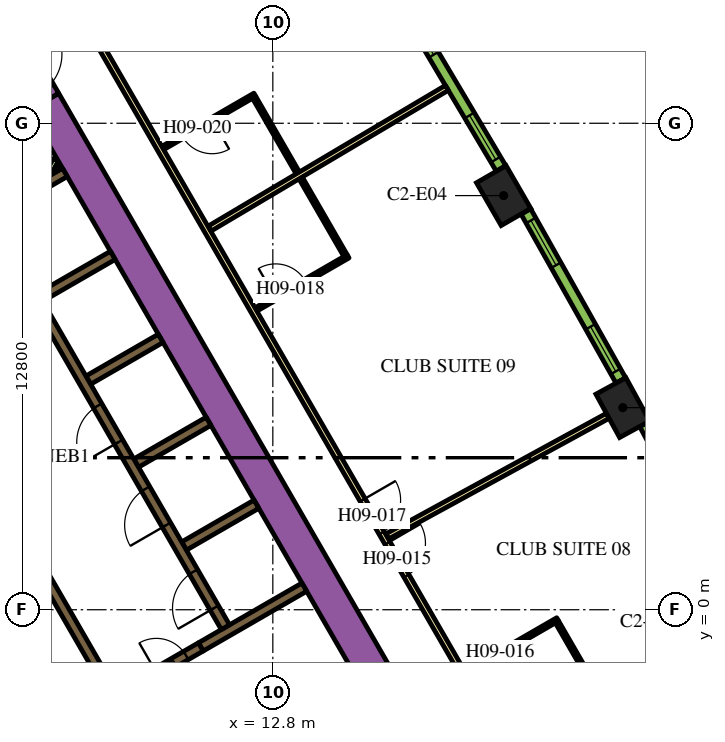
"""IFC4 building model, lengths in metres.
Left out: names, types, materials, properties, quantities, classifications, styles, units other than length and angle.
Written with IfcOpenShell. Run it as: python <this file> out.ifc"""

import sys

from ifc_helpers import new_model, si_unit, direction, frame, frame_2d, origin, origin_2d, place, context, subcontext, project, spatial, polyline, rectangle, outline, extrude, element, fill, save


model = new_model("IFC4")
c1 = context("Model", 3, precision=1e-05, world=origin(), true_north=direction((0.0, 1.0)))
c2 = subcontext(c1, "Body", "Model", "MODEL_VIEW")
j1 = project(units=[si_unit("LENGTHUNIT", "METRE"), si_unit("PLANEANGLEUNIT", "RADIAN")], contexts=[c1])
p1 = place(None, origin())
s1 = spatial("IfcSite", under=j1, at=p1, CompositionType="ELEMENT")
p2 = place(p1, origin())
s2 = spatial("IfcBuilding", under=s1, at=p2, CompositionType="ELEMENT")
p3 = place(p2, frame((0.0, 0.0, 118.8)))
s3 = spatial("IfcBuildingStorey", under=s2, at=p3, CompositionType="ELEMENT", Elevation=118.8)
for number, where, z_axis, x_axis in (
    (1, (22.009, 5.317, 0.0), (0.0, 0.0, 1.0), (-0.48, 0.877, 0.0)),
    (2, (18.874, 10.897, 0.0), (0.0, 0.0, 1.0), (-0.5, 0.866, 0.0)),
):
    element("IfcColumn", number, at=place(p3, frame(where, z_axis=z_axis, x_axis=x_axis)), inside=s3, PredefinedType="COLUMN", context=c2, shape_type="SweptSolid", body=[
        extrude(rectangle(XDim=1.3, YDim=0.9, at=origin_2d()), origin(), (0.0, 0.0, 1.0), 3.9),
    ])
p4 = place(p3, frame((6.776, 13.364, 0.0), z_axis=(0.0, 0.0, 1.0), x_axis=(0.500004177138, -0.8660229921, 0.0)))
e3 = element("IfcWall", 3, at=p4, inside=s3, PredefinedType="SOLIDWALL", context=c2, shape_type="SweptSolid", body=[
    extrude(rectangle(XDim=20.204, YDim=0.9, at=frame_2d((10.102, 0.0))), origin(), (0.0, 0.0, 1.0), 3.9),
])
p5 = place(p3, frame((10.464, 1.677, 0.0), z_axis=(0.0, 0.0, 1.0), x_axis=(0.86605622881, 0.499946605688, 0.0)))
e4 = element("IfcWall", 4, at=p5, inside=s3, PredefinedType="SOLIDWALL", context=c2, shape_type="SweptSolid", body=[
    extrude(rectangle(XDim=2.2, YDim=0.25, at=frame_2d((1.1, 0.0))), origin(), (0.0, 0.0, 1.0), 3.9),
])
p6 = place(p3, frame((13.629, 0.594, 0.0), z_axis=(0.0, 0.0, 1.0), x_axis=(-0.86602790099, -0.499995674689, 0.0)))
e5 = element("IfcWall", 5, at=p6, inside=s3, PredefinedType="SOLIDWALL", context=c2, shape_type="SweptSolid", body=[
    extrude(rectangle(XDim=3.146, YDim=0.25, at=frame_2d((1.573, 0.0))), origin(), (0.0, 0.0, 1.0), 3.9),
])
for number, where, z_axis, x_axis in (
    (6, (9.204, 3.859, 0.0), (0.0, 0.0, 1.0), (0.866, 0.5, 0.0)),
    (7, (7.944, 6.041, 0.0), (0.0, 0.0, 1.0), (0.866, 0.5, 0.0)),
    (8, (6.684, 8.224, 0.0), (0.0, 0.0, 1.0), (0.866, 0.5, 0.0)),
):
    element("IfcWall", number, at=place(p3, frame(where, z_axis=z_axis, x_axis=x_axis)), inside=s3, PredefinedType="SOLIDWALL", context=c2, shape_type="SweptSolid", body=[
        extrude(rectangle(XDim=2.2, YDim=0.25, at=frame_2d((1.1, 0.0))), origin(), (0.0, 0.0, 1.0), 3.9),
    ])
p7 = place(p3, origin())
e9 = element("IfcWall", 9, at=p7, inside=s3, PredefinedType="SOLIDWALL", context=c2, shape_type="SweptSolid", body=[
    extrude(outline(polyline([(5.27, 10.173), (5.27, 10.173), (4.683, 9.834), (4.504, 9.731), (4.442, 9.839), (4.431, 9.856), (4.419, 9.871), (4.406, 9.885), (4.39, 9.898), (4.374, 9.909), (4.357, 9.918), (4.341, 9.925), (7.266, 11.614), (7.391, 11.398), (5.486, 10.298), (5.486, 10.298), (5.27, 10.173), (5.27, 10.173)])), origin(), (0.0, 0.0, 1.0), 3.9),
])
p8 = place(p3, frame((6.872, 11.45, 0.0), z_axis=(0.0, 0.0, 1.0), x_axis=(0.499846793097, 0.866113839764, 0.0)))
e10 = element("IfcWall", 10, at=p8, inside=s3, PredefinedType="PARTITIONING", context=c2, shape_type="SweptSolid", body=[
    extrude(rectangle(XDim=0.453, YDim=0.15, at=frame_2d((0.227, 0.0))), origin(), (0.0, 0.0, 1.0), 2.75),
])
p9 = place(p3, frame((7.131, 11.6, 0.0), z_axis=(0.0, 0.0, 1.0), x_axis=(0.498600033135, 0.866832167699, 0.0)))
e11 = element("IfcWall", 11, at=p9, inside=s3, PredefinedType="PARTITIONING", context=c2, shape_type="SweptSolid", body=[
    extrude(rectangle(XDim=0.107, YDim=0.15, at=frame_2d((0.053, 0.0))), origin(), (0.0, 0.0, 1.0), 2.75),
])
p10 = place(p3, frame((11.553, -0.46, 0.0), z_axis=(0.0, 0.0, 1.0), x_axis=(-0.500006514828, 0.866021642414, 0.0)))
e12 = element("IfcWall", 12, at=p10, inside=s3, PredefinedType="SOLIDWALL", context=c2, shape_type="SweptSolid", body=[
    extrude(rectangle(XDim=12.35, YDim=0.25, at=frame_2d((6.175, 0.0))), origin(), (0.0, 0.0, 1.0), 3.9),
])
p11 = place(p10, frame((0.585, 0.0, 0.0)))
e13 = element("IfcOpeningElement", 13, at=p11, cuts=e12, PredefinedType="OPENING", context=c2, shape_type="SweptSolid", body=[
    extrude(rectangle(XDim=1.1, YDim=2.1, at=frame_2d((0.55, 1.05))), frame((0.0, 0.135, 0.0), z_axis=(0.0, -1.0, 0.0), x_axis=(1.0, 0.0, 0.0)), (0.0, 0.0, 1.0), 0.27),
])
p12 = place(p10, frame((3.105, 0.0, 0.0)))
e14 = element("IfcOpeningElement", 14, at=p12, cuts=e12, PredefinedType="OPENING", context=c2, shape_type="SweptSolid", body=[
    extrude(rectangle(XDim=1.1, YDim=2.1, at=frame_2d((0.55, 1.05))), frame((0.0, 0.135, 0.0), z_axis=(0.0, -1.0, 0.0), x_axis=(1.0, 0.0, 0.0)), (0.0, 0.0, 1.0), 0.27),
])
p13 = place(p10, frame((5.625, 0.0, 0.0)))
e15 = element("IfcOpeningElement", 15, at=p13, cuts=e12, PredefinedType="OPENING", context=c2, shape_type="SweptSolid", body=[
    extrude(rectangle(XDim=1.1, YDim=2.1, at=frame_2d((0.55, 1.05))), frame((0.0, 0.135, 0.0), z_axis=(0.0, -1.0, 0.0), x_axis=(1.0, 0.0, 0.0)), (0.0, 0.0, 1.0), 0.27),
])
p14 = place(p3, frame((8.565, -2.185, 0.0), z_axis=(0.0, 0.0, 1.0), x_axis=(-0.499997954832, 0.866026584559, 0.0)))
e16 = element("IfcWall", 16, at=p14, inside=s3, PredefinedType="SOLIDWALL", context=c2, shape_type="SweptSolid", body=[
    extrude(rectangle(XDim=12.35, YDim=0.25, at=frame_2d((6.175, 0.0))), origin(), (0.0, 0.0, 1.0), 3.9),
])
p15 = place(p14, frame((5.725, 0.0, 0.0)))
e17 = element("IfcOpeningElement", 17, at=p15, cuts=e16, PredefinedType="OPENING", context=c2, shape_type="SweptSolid", body=[
    extrude(rectangle(XDim=0.9, YDim=2.1, at=frame_2d((0.45, 1.05))), frame((0.0, 0.135, 0.0), z_axis=(0.0, -1.0, 0.0), x_axis=(1.0, 0.0, 0.0)), (0.0, 0.0, 1.0), 0.27),
])
p16 = place(p3, frame((9.346, -1.879, 0.0), z_axis=(0.0, 0.0, 1.0), x_axis=(0.866047807691, 0.499961193289, 0.0)))
e18 = element("IfcWall", 18, at=p16, inside=s3, PredefinedType="SOLIDWALL", context=c2, shape_type="SweptSolid", body=[
    extrude(rectangle(XDim=1.8, YDim=0.25, at=frame_2d((0.9, 0.0))), origin(), (0.0, 0.0, 1.0), 3.9),
])
p17 = place(p16, frame((0.45, 0.0, 0.0)))
e19 = element("IfcOpeningElement", 19, at=p17, cuts=e18, PredefinedType="OPENING", context=c2, shape_type="SweptSolid", body=[
    extrude(rectangle(XDim=0.9, YDim=2.1, at=frame_2d((0.45, 1.05))), frame((0.0, 0.135, 0.0), z_axis=(0.0, -1.0, 0.0), x_axis=(1.0, 0.0, 0.0)), (0.0, 0.0, 1.0), 0.27),
])
p18 = place(p3, frame((5.926, 14.836, 0.0), z_axis=(0.0, 0.0, 1.0), x_axis=(0.500062241894, -0.865989465428, 0.0)))
e20 = element("IfcWall", 20, at=p18, inside=s3, PredefinedType="SOLIDWALL", context=c2, shape_type="SweptSolid", body=[
    extrude(rectangle(XDim=1.7, YDim=0.9, at=frame_2d((0.85, 0.0))), origin(), (0.0, 0.0, 1.0), 3.9),
])
p19 = place(p18, frame((0.25, 0.0, 0.0)))
e21 = element("IfcOpeningElement", 21, at=p19, cuts=e20, PredefinedType="OPENING", context=c2, shape_type="SweptSolid", body=[
    extrude(rectangle(XDim=1.2, YDim=2.1, at=frame_2d((0.6, 1.05))), frame((0.0, 0.46, 0.0), z_axis=(0.0, -1.0, 0.0), x_axis=(1.0, 0.0, 0.0)), (0.0, 0.0, 1.0), 0.92),
])
p20 = place(p3, frame((6.163, 18.475, 0.0), z_axis=(0.0, 0.0, 1.0), x_axis=(0.500001317485, -0.866024643133, 0.0)))
e22 = element("IfcWall", 22, at=p20, inside=s3, PredefinedType="PARTITIONING", context=c2, shape_type="SweptSolid", body=[
    extrude(rectangle(XDim=25.767, YDim=0.15, at=frame_2d((12.883, 0.0))), origin(), (0.0, 0.0, 1.0), 2.75),
])
p21 = place(p20, frame((19.306, 0.0, 0.0)))
e23 = element("IfcOpeningElement", 23, at=p21, cuts=e22, PredefinedType="OPENING", context=c2, shape_type="SweptSolid", body=[
    extrude(rectangle(XDim=1.0, YDim=2.1, at=frame_2d((0.5, 1.05))), frame((0.0, 0.085, 0.0), z_axis=(0.0, -1.0, 0.0), x_axis=(1.0, 0.0, 0.0)), (0.0, 0.0, 1.0), 0.17),
])
p22 = place(p20, frame((17.999, 0.0, 0.0)))
e24 = element("IfcOpeningElement", 24, at=p22, cuts=e22, PredefinedType="OPENING", context=c2, shape_type="SweptSolid", body=[
    extrude(rectangle(XDim=1.0, YDim=2.1, at=frame_2d((0.5, 1.05))), frame((0.0, 0.085, 0.0), z_axis=(0.0, -1.0, 0.0), x_axis=(1.0, 0.0, 0.0)), (0.0, 0.0, 1.0), 0.17),
])
p23 = place(p20, frame((0.596, 0.0, 0.0)))
e25 = element("IfcOpeningElement", 25, at=p23, cuts=e22, PredefinedType="OPENING", context=c2, shape_type="SweptSolid", body=[
    extrude(rectangle(XDim=1.0, YDim=2.1, at=frame_2d((0.5, 1.05))), frame((0.0, 0.085, 0.0), z_axis=(0.0, -1.0, 0.0), x_axis=(1.0, 0.0, 0.0)), (0.0, 0.0, 1.0), 0.17),
])
p24 = place(p3, frame((17.379, 13.731, 0.0), z_axis=(0.0, 0.0, 1.0), x_axis=(-0.860132461691, -0.510070728768, 0.0)))
e26 = element("IfcWall", 26, at=p24, inside=s3, PredefinedType="PARTITIONING", context=c2, shape_type="SweptSolid", body=[
    extrude(rectangle(XDim=7.257, YDim=0.15, at=frame_2d((3.628, 0.0))), origin(), (0.0, 0.0, 1.0), 2.75),
])
p25 = place(p3, frame((21.614, 5.102, 0.0), z_axis=(0.0, 0.0, 1.0), x_axis=(-0.877484555087, -0.479604895287, 0.0)))
e27 = element("IfcWall", 27, at=p25, inside=s3, PredefinedType="PARTITIONING", context=c2, shape_type="SweptSolid", body=[
    extrude(rectangle(XDim=6.611, YDim=0.15, at=frame_2d((3.306, 0.0))), origin(), (0.0, 0.0, 1.0), 2.75),
])
p26 = place(p3, frame((20.296, -0.254, 0.0), z_axis=(0.0, 0.0, 1.0), x_axis=(-0.866034573852, -0.49998411664, 0.0)))
e28 = element("IfcWall", 28, at=p26, inside=s3, PredefinedType="PARTITIONING", context=c2, shape_type="SweptSolid", body=[
    extrude(rectangle(XDim=2.8, YDim=0.1, at=frame_2d((1.4, 0.0))), origin(), (0.0, 0.0, 1.0), 2.75),
])
p27 = place(p26, frame((1.3, 0.0, 0.0)))
e29 = element("IfcOpeningElement", 29, at=p27, cuts=e28, PredefinedType="OPENING", context=c2, shape_type="SweptSolid", body=[
    extrude(rectangle(XDim=0.9, YDim=2.1, at=frame_2d((0.45, 1.05))), frame((0.0, 0.06, 0.0), z_axis=(0.0, -1.0, 0.0), x_axis=(1.0, 0.0, 0.0)), (0.0, 0.0, 1.0), 0.12),
])
p28 = place(p3, frame((20.278, -0.323, 0.0), z_axis=(0.0, 0.0, 1.0), x_axis=(0.500001309137, -0.866024647952, 0.0)))
e30 = element("IfcWall", 30, at=p28, inside=s3, PredefinedType="PARTITIONING", context=c2, shape_type="SweptSolid", body=[
    extrude(rectangle(XDim=2.4, YDim=0.1, at=frame_2d((1.2, 0.0))), origin(), (0.0, 0.0, 1.0), 2.75),
])
p29 = place(p3, frame((12.355, 7.9, 0.0), z_axis=(0.0, 0.0, 1.0), x_axis=(0.866034573852, 0.49998411664, 0.0)))
e31 = element("IfcWall", 31, at=p29, inside=s3, PredefinedType="PARTITIONING", context=c2, shape_type="SweptSolid", body=[
    extrude(rectangle(XDim=2.8, YDim=0.1, at=frame_2d((1.4, 0.0))), origin(), (0.0, 0.0, 1.0), 2.75),
])
p30 = place(p29, frame((0.6, 0.0, 0.0)))
e32 = element("IfcOpeningElement", 32, at=p30, cuts=e31, PredefinedType="OPENING", context=c2, shape_type="SweptSolid", body=[
    extrude(rectangle(XDim=0.9, YDim=2.1, at=frame_2d((0.45, 1.05))), frame((0.0, 0.06, 0.0), z_axis=(0.0, -1.0, 0.0), x_axis=(1.0, 0.0, 0.0)), (0.0, 0.0, 1.0), 0.12),
])
p31 = place(p3, frame((14.712, 9.318, 0.0), z_axis=(0.0, 0.0, 1.0), x_axis=(-0.50000006957, 0.866025363618, 0.0)))
e33 = element("IfcWall", 33, at=p31, inside=s3, PredefinedType="PARTITIONING", context=c2, shape_type="SweptSolid", body=[
    extrude(rectangle(XDim=2.36, YDim=0.1, at=frame_2d((1.18, 0.0))), origin(), (0.0, 0.0, 1.0), 2.75),
])
p32 = place(p3, frame((12.327, 13.549, 0.0), z_axis=(0.0, 0.0, 1.0), x_axis=(-0.866056369097, -0.49994636267, 0.0)))
e34 = element("IfcWall", 34, at=p32, inside=s3, PredefinedType="PARTITIONING", context=c2, shape_type="SweptSolid", body=[
    extrude(rectangle(XDim=2.8, YDim=0.1, at=frame_2d((1.4, 0.0))), origin(), (0.0, 0.0, 1.0), 2.75),
])
p33 = place(p32, frame((1.3, 0.0, 0.0)))
e35 = element("IfcOpeningElement", 35, at=p33, cuts=e34, PredefinedType="OPENING", context=c2, shape_type="SweptSolid", body=[
    extrude(rectangle(XDim=0.9, YDim=2.1, at=frame_2d((0.45, 1.05))), frame((0.0, 0.06, 0.0), z_axis=(0.0, -1.0, 0.0), x_axis=(1.0, 0.0, 0.0)), (0.0, 0.0, 1.0), 0.12),
])
p34 = place(p3, frame((12.309, 13.481, 0.0), z_axis=(0.0, 0.0, 1.0), x_axis=(0.499968531483, -0.866043571379, 0.0)))
e36 = element("IfcWall", 36, at=p34, inside=s3, PredefinedType="PARTITIONING", context=c2, shape_type="SweptSolid", body=[
    extrude(rectangle(XDim=2.29, YDim=0.1, at=frame_2d((1.145, 0.0))), origin(), (0.0, 0.0, 1.0), 2.75),
])
p35 = place(p3, frame((24.977, 0.383, 0.0), z_axis=(0.0, 0.0, 1.0), x_axis=(-0.469323203119, 0.883026461106, 0.0)))
e37 = element("IfcWall", 37, at=p35, inside=s3, PredefinedType="SOLIDWALL", context=c2, shape_type="SweptSolid", body=[
    extrude(rectangle(XDim=5.101, YDim=0.29, at=frame_2d((2.55, 0.0))), origin(), (0.0, 0.0, 1.0), 3.65),
])
p36 = place(p35, frame((0.273, 0.0, 0.9)))
e38 = element("IfcOpeningElement", 38, at=p36, cuts=e37, PredefinedType="OPENING", context=c2, shape_type="SweptSolid", body=[
    extrude(rectangle(XDim=1.35, YDim=2.15, at=frame_2d((0.675, 1.075))), frame((0.0, 0.155, 0.0), z_axis=(0.0, -1.0, 0.0), x_axis=(1.0, 0.0, 0.0)), (0.0, 0.0, 1.0), 0.31),
])
p37 = place(p35, frame((3.478, 0.0, 0.9)))
e39 = element("IfcOpeningElement", 39, at=p37, cuts=e37, PredefinedType="OPENING", context=c2, shape_type="SweptSolid", body=[
    extrude(rectangle(XDim=1.35, YDim=2.15, at=frame_2d((0.675, 1.075))), frame((0.0, 0.155, 0.0), z_axis=(0.0, -1.0, 0.0), x_axis=(1.0, 0.0, 0.0)), (0.0, 0.0, 1.0), 0.31),
])
p38 = place(p3, frame((21.956, 6.033, 0.0), z_axis=(0.0, 0.0, 1.0), x_axis=(-0.48983164787, 0.87181704316, 0.0)))
e40 = element("IfcWall", 40, at=p38, inside=s3, PredefinedType="SOLIDWALL", context=c2, shape_type="SweptSolid", body=[
    extrude(rectangle(XDim=5.1, YDim=0.29, at=frame_2d((2.55, 0.0))), origin(), (0.0, 0.0, 1.0), 3.65),
])
p39 = place(p38, frame((0.273, 0.0, 0.9)))
e41 = element("IfcOpeningElement", 41, at=p39, cuts=e40, PredefinedType="OPENING", context=c2, shape_type="SweptSolid", body=[
    extrude(rectangle(XDim=1.35, YDim=2.15, at=frame_2d((0.675, 1.075))), frame((0.0, 0.155, 0.0), z_axis=(0.0, -1.0, 0.0), x_axis=(1.0, 0.0, 0.0)), (0.0, 0.0, 1.0), 0.31),
])
p40 = place(p38, frame((3.478, 0.0, 0.9)))
e42 = element("IfcOpeningElement", 42, at=p40, cuts=e40, PredefinedType="OPENING", context=c2, shape_type="SweptSolid", body=[
    extrude(rectangle(XDim=1.35, YDim=2.15, at=frame_2d((0.675, 1.075))), frame((0.0, 0.155, 0.0), z_axis=(0.0, -1.0, 0.0), x_axis=(1.0, 0.0, 0.0)), (0.0, 0.0, 1.0), 0.31),
])
p41 = place(p3, frame((18.805, 11.611, 0.0), z_axis=(0.0, 0.0, 1.0), x_axis=(-0.510054281659, 0.860142214847, 0.0)))
e43 = element("IfcWall", 43, at=p41, inside=s3, PredefinedType="SOLIDWALL", context=c2, shape_type="SweptSolid", body=[
    extrude(rectangle(XDim=5.101, YDim=0.29, at=frame_2d((2.55, 0.0))), origin(), (0.0, 0.0, 1.0), 3.65),
])
p42 = place(p41, frame((0.273, 0.0, 0.9)))
e44 = element("IfcOpeningElement", 44, at=p42, cuts=e43, PredefinedType="OPENING", context=c2, shape_type="SweptSolid", body=[
    extrude(rectangle(XDim=1.35, YDim=2.15, at=frame_2d((0.675, 1.075))), frame((0.0, 0.155, 0.0), z_axis=(0.0, -1.0, 0.0), x_axis=(1.0, 0.0, 0.0)), (0.0, 0.0, 1.0), 0.31),
])
p43 = place(p41, frame((3.478, 0.0, 0.9)))
e45 = element("IfcOpeningElement", 45, at=p43, cuts=e43, PredefinedType="OPENING", context=c2, shape_type="SweptSolid", body=[
    extrude(rectangle(XDim=1.35, YDim=2.15, at=frame_2d((0.675, 1.075))), frame((0.0, 0.155, 0.0), z_axis=(0.0, -1.0, 0.0), x_axis=(1.0, 0.0, 0.0)), (0.0, 0.0, 1.0), 0.31),
])
p44 = place(p11, origin())
e46 = element("IfcDoor", 46, at=p44, inside=s3, OperationType="DOUBLE_DOOR_SLIDING", PredefinedType="DOOR", context=c2, shape_type="SweptSolid", body=[
    extrude(rectangle(XDim=1.1, YDim=2.1, at=frame_2d((0.55, 1.05))), frame((0.0, 0.025, 0.0), z_axis=(0.0, -1.0, 0.0), x_axis=(1.0, 0.0, 0.0)), (0.0, 0.0, 1.0), 0.05),
])
fill(e13, e46)
p45 = place(p12, origin())
e47 = element("IfcDoor", 47, at=p45, inside=s3, OperationType="DOUBLE_DOOR_SLIDING", PredefinedType="DOOR", context=c2, shape_type="SweptSolid", body=[
    extrude(rectangle(XDim=1.1, YDim=2.1, at=frame_2d((0.55, 1.05))), frame((0.0, 0.025, 0.0), z_axis=(0.0, -1.0, 0.0), x_axis=(1.0, 0.0, 0.0)), (0.0, 0.0, 1.0), 0.05),
])
fill(e14, e47)
p46 = place(p13, origin())
e48 = element("IfcDoor", 48, at=p46, inside=s3, OperationType="DOUBLE_DOOR_SLIDING", PredefinedType="DOOR", context=c2, shape_type="SweptSolid", body=[
    extrude(rectangle(XDim=1.1, YDim=2.1, at=frame_2d((0.55, 1.05))), frame((0.0, 0.025, 0.0), z_axis=(0.0, -1.0, 0.0), x_axis=(1.0, 0.0, 0.0)), (0.0, 0.0, 1.0), 0.05),
])
fill(e15, e48)
p47 = place(p17, origin())
e49 = element("IfcDoor", 49, at=p47, inside=s3, OperationType="SINGLE_SWING_LEFT", PredefinedType="DOOR", context=c2, shape_type="SweptSolid", body=[
    extrude(rectangle(XDim=0.9, YDim=2.1, at=frame_2d((0.45, 1.05))), frame((0.0, 0.025, 0.0), z_axis=(0.0, -1.0, 0.0), x_axis=(1.0, 0.0, 0.0)), (0.0, 0.0, 1.0), 0.05),
])
fill(e19, e49)
p48 = place(p21, origin())
e50 = element("IfcDoor", 50, at=p48, inside=s3, OperationType="SINGLE_SWING_LEFT", PredefinedType="DOOR", context=c2, shape_type="SweptSolid", body=[
    extrude(rectangle(XDim=1.0, YDim=2.1, at=frame_2d((0.5, 1.05))), frame((0.0, 0.025, 0.0), z_axis=(0.0, -1.0, 0.0), x_axis=(1.0, 0.0, 0.0)), (0.0, 0.0, 1.0), 0.05),
])
fill(e23, e50)
p49 = place(p27, origin())
e51 = element("IfcDoor", 51, at=p49, inside=s3, OperationType="SINGLE_SWING_LEFT", PredefinedType="DOOR", context=c2, shape_type="SweptSolid", body=[
    extrude(rectangle(XDim=0.9, YDim=2.1, at=frame_2d((0.45, 1.05))), frame((0.0, 0.025, 0.0), z_axis=(0.0, -1.0, 0.0), x_axis=(1.0, 0.0, 0.0)), (0.0, 0.0, 1.0), 0.05),
])
fill(e29, e51)
p50 = place(p22, origin())
e52 = element("IfcDoor", 52, at=p50, inside=s3, OperationType="SINGLE_SWING_RIGHT", PredefinedType="DOOR", context=c2, shape_type="SweptSolid", body=[
    extrude(rectangle(XDim=1.0, YDim=2.1, at=frame_2d((0.5, 1.05))), frame((0.0, 0.025, 0.0), z_axis=(0.0, -1.0, 0.0), x_axis=(1.0, 0.0, 0.0)), (0.0, 0.0, 1.0), 0.05),
])
fill(e24, e52)
p51 = place(p30, origin())
e53 = element("IfcDoor", 53, at=p51, inside=s3, OperationType="SINGLE_SWING_RIGHT", PredefinedType="DOOR", context=c2, shape_type="SweptSolid", body=[
    extrude(rectangle(XDim=0.9, YDim=2.1, at=frame_2d((0.45, 1.05))), frame((0.0, 0.025, 0.0), z_axis=(0.0, -1.0, 0.0), x_axis=(1.0, 0.0, 0.0)), (0.0, 0.0, 1.0), 0.05),
])
fill(e32, e53)
p52 = place(p33, origin())
e54 = element("IfcDoor", 54, at=p52, inside=s3, OperationType="SINGLE_SWING_LEFT", PredefinedType="DOOR", context=c2, shape_type="SweptSolid", body=[
    extrude(rectangle(XDim=0.9, YDim=2.1, at=frame_2d((0.45, 1.05))), frame((0.0, 0.025, 0.0), z_axis=(0.0, -1.0, 0.0), x_axis=(1.0, 0.0, 0.0)), (0.0, 0.0, 1.0), 0.05),
])
fill(e35, e54)
p53 = place(p39, origin())
e55 = element("IfcWindow", 55, at=p53, inside=s3, PartitioningType="DOUBLE_PANEL_VERTICAL", PredefinedType="WINDOW", context=c2, shape_type="SweptSolid", body=[
    extrude(rectangle(XDim=1.35, YDim=2.15, at=frame_2d((0.675, 1.075))), frame((0.0, 0.015, 0.0), z_axis=(0.0, -1.0, 0.0), x_axis=(1.0, 0.0, 0.0)), (0.0, 0.0, 1.0), 0.06),
])
fill(e41, e55)
p54 = place(p40, origin())
e56 = element("IfcWindow", 56, at=p54, inside=s3, PartitioningType="DOUBLE_PANEL_VERTICAL", PredefinedType="WINDOW", context=c2, shape_type="SweptSolid", body=[
    extrude(rectangle(XDim=1.35, YDim=2.15, at=frame_2d((0.675, 1.075))), frame((0.0, 0.015, 0.0), z_axis=(0.0, -1.0, 0.0), x_axis=(1.0, 0.0, 0.0)), (0.0, 0.0, 1.0), 0.06),
])
fill(e42, e56)
p55 = place(p42, origin())
e57 = element("IfcWindow", 57, at=p55, inside=s3, PartitioningType="DOUBLE_PANEL_VERTICAL", PredefinedType="WINDOW", context=c2, shape_type="SweptSolid", body=[
    extrude(rectangle(XDim=1.35, YDim=2.15, at=frame_2d((0.675, 1.075))), frame((0.0, 0.015, 0.0), z_axis=(0.0, -1.0, 0.0), x_axis=(1.0, 0.0, 0.0)), (0.0, 0.0, 1.0), 0.06),
])
fill(e44, e57)
p56 = place(p43, origin())
e58 = element("IfcWindow", 58, at=p56, inside=s3, PartitioningType="DOUBLE_PANEL_VERTICAL", PredefinedType="WINDOW", context=c2, shape_type="SweptSolid", body=[
    extrude(rectangle(XDim=1.35, YDim=2.15, at=frame_2d((0.675, 1.075))), frame((0.0, 0.015, 0.0), z_axis=(0.0, -1.0, 0.0), x_axis=(1.0, 0.0, 0.0)), (0.0, 0.0, 1.0), 0.06),
])
fill(e45, e58)
save(model, sys.argv[1])
